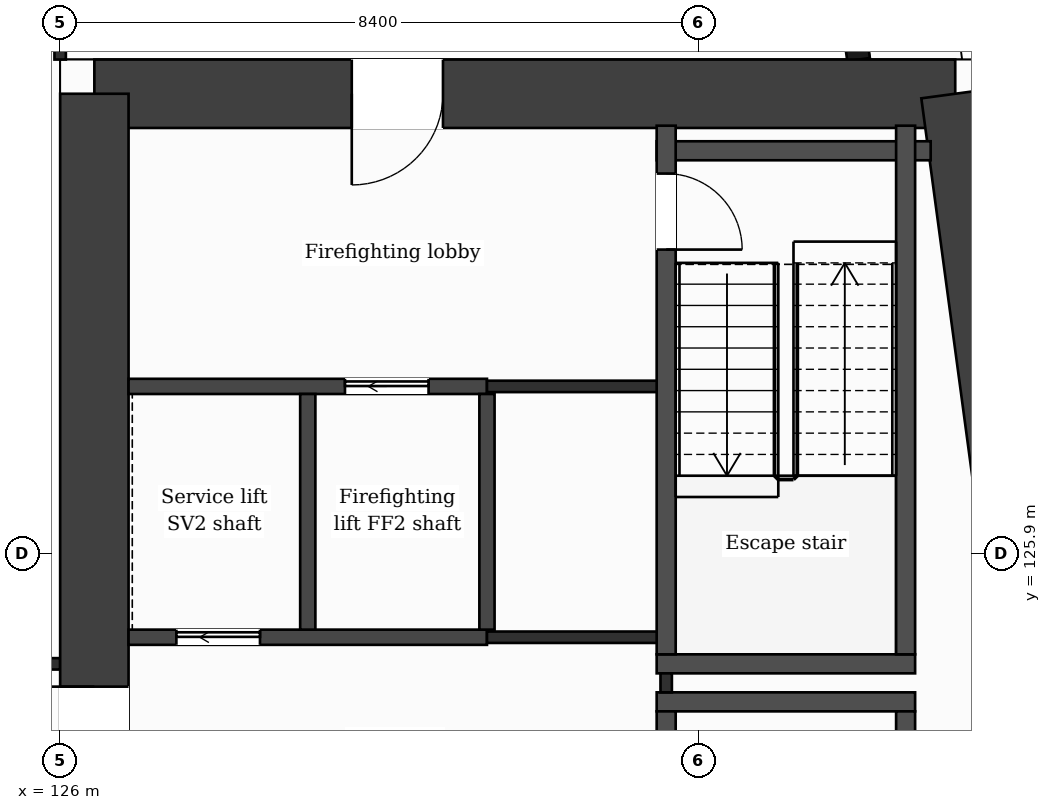
"""IFC4 building model, lengths in metres.
Left out: names, types, materials, properties, quantities, classifications, styles, units other than length and angle.
Written with IfcOpenShell. Run it as: python <this file> out.ifc"""

import sys

from ifc_helpers import new_model, si_unit, direction, frame, frame_2d, origin, place, context, subcontext, project, spatial, rectangle, extrude, element, fill, save


model = new_model("IFC4")
c1 = context("Model", 3, precision=1e-05, world=origin(), true_north=direction((0.0, 1.0)))
c2 = subcontext(c1, "Body", "Model", "MODEL_VIEW")
j1 = project(units=[si_unit("LENGTHUNIT", "METRE"), si_unit("PLANEANGLEUNIT", "RADIAN")], contexts=[c1])
p1 = place(None, origin())
s1 = spatial("IfcSite", under=j1, at=p1, CompositionType="ELEMENT")
p2 = place(p1, origin())
s2 = spatial("IfcBuilding", under=s1, at=p2, CompositionType="ELEMENT")
p3 = place(p2, frame((0.0, 0.0, 166.3)))
s3 = spatial("IfcBuildingStorey", under=s2, at=p3, CompositionType="ELEMENT", Elevation=166.3)
p4 = place(p3, frame((126.45, 131.95, 0.0), z_axis=(0.0, 0.0, 1.0), x_axis=(1.0, 0.0, 0.0)))
e1 = element("IfcWall", 1, at=p4, inside=s3, PredefinedType="SHEAR", context=c2, shape_type="SweptSolid", body=[
    extrude(rectangle(XDim=11.326, YDim=0.9, at=frame_2d((5.663, 0.0))), origin(), (0.0, 0.0, 1.0), 3.7),
])
p5 = place(p4, frame((3.386, 0.0, 0.0)))
e2 = element("IfcOpeningElement", 2, at=p5, cuts=e1, PredefinedType="OPENING", context=c2, shape_type="SweptSolid", body=[
    extrude(rectangle(XDim=1.2, YDim=2.1, at=frame_2d((0.6, 1.05))), frame((0.0, 0.46, 0.0), z_axis=(0.0, -1.0, 0.0), x_axis=(1.0, 0.0, 0.0)), (0.0, 0.0, 1.0), 0.92),
])
p6 = place(p3, frame((137.776, 131.95, 0.0), z_axis=(0.0, 0.0, 1.0), x_axis=(0.133421759112, -0.991059349482, 0.0)))
e3 = element("IfcWall", 3, at=p6, inside=s3, PredefinedType="SHEAR", context=c2, shape_type="SweptSolid", body=[
    extrude(rectangle(XDim=21.29, YDim=0.9, at=frame_2d((10.645, 0.0))), origin(), (0.0, 0.0, 1.0), 3.7),
])
p7 = place(p3, frame((126.45, 110.85, 0.0), z_axis=(0.0, 0.0, 1.0), x_axis=(0.0, 1.0, 0.0)))
e4 = element("IfcWall", 4, at=p7, inside=s3, PredefinedType="SHEAR", context=c2, shape_type="SweptSolid", body=[
    extrude(rectangle(XDim=21.1, YDim=0.9, at=frame_2d((10.55, 0.0))), origin(), (0.0, 0.0, 1.0), 3.7),
])
p8 = place(p7, frame((11.9, 0.0, 0.0)))
e5 = element("IfcOpeningElement", 5, at=p8, cuts=e4, PredefinedType="OPENING", context=c2, shape_type="SweptSolid", body=[
    extrude(rectangle(XDim=1.4, YDim=2.1, at=frame_2d((0.7, 1.05))), frame((0.0, 0.46, 0.0), z_axis=(0.0, -1.0, 0.0), x_axis=(1.0, 0.0, 0.0)), (0.0, 0.0, 1.0), 0.92),
])
p9 = place(p3, frame((136.504, 132.4, 0.0), z_axis=(0.0, 0.0, 1.0), x_axis=(-0.133399697462, 0.99106231929, 0.0)))
e6 = element("IfcWall", 6, at=p9, inside=s3, PredefinedType="SOLIDWALL", context=c2, shape_type="SweptSolid", body=[
    extrude(rectangle(XDim=6.74, YDim=0.3, at=frame_2d((3.37, 0.0))), origin(), (0.0, 0.0, 1.0), 3.38),
])
p10 = place(p9, frame((1.115, 0.0, 0.0)))
e7 = element("IfcOpeningElement", 7, at=p10, cuts=e6, PredefinedType="OPENING", context=c2, shape_type="SweptSolid", body=[
    extrude(rectangle(XDim=1.2, YDim=2.4, at=frame_2d((0.6, 1.2))), frame((0.0, 0.16, 0.0), z_axis=(0.0, -1.0, 0.0), x_axis=(1.0, 0.0, 0.0)), (0.0, 0.0, 1.0), 0.32),
])
p11 = place(p9, frame((3.835, 0.0, 0.9)))
e8 = element("IfcOpeningElement", 8, at=p11, cuts=e6, PredefinedType="OPENING", context=c2, shape_type="SweptSolid", body=[
    extrude(rectangle(XDim=2.4, YDim=2.1, at=frame_2d((1.2, 1.05))), frame((0.0, 0.16, 0.0), z_axis=(0.0, -1.0, 0.0), x_axis=(1.0, 0.0, 0.0)), (0.0, 0.0, 1.0), 0.32),
])
for number, where, z_axis, x_axis in (
    (9, (133.848, 123.95, 0.0), (0.0, 0.0, 1.0), (1.0, 0.0, 0.0)),
    (10, (133.848, 124.45, 0.0), (0.0, 0.0, 1.0), (1.0, 0.0, 0.0)),
):
    element("IfcWall", number, at=place(p3, frame(where, z_axis=z_axis, x_axis=x_axis)), inside=s3, PredefinedType="PARTITIONING", context=c2, shape_type="SweptSolid", body=[
        extrude(rectangle(XDim=3.4, YDim=0.25, at=frame_2d((1.7, 0.0))), origin(), (0.0, 0.0, 1.0), 3.38),
    ])
p12 = place(p3, frame((100.8, 124.45, 0.0), z_axis=(0.0, 0.0, 1.0), x_axis=(1.0, 0.0, 0.0)))
e11 = element("IfcWall", 11, at=p12, inside=s3, PredefinedType="PARTITIONING", context=c2, shape_type="SweptSolid", body=[
    extrude(rectangle(XDim=25.2, YDim=0.15, at=frame_2d((12.6, 0.0))), origin(), (0.0, 0.0, 1.0), 3.38),
])
p13 = place(p12, frame((4.275, 0.0, 0.0)))
e12 = element("IfcOpeningElement", 12, at=p13, cuts=e11, PredefinedType="OPENING", context=c2, shape_type="SweptSolid", body=[
    extrude(rectangle(XDim=1.0, YDim=2.1, at=frame_2d((0.5, 1.05))), frame((0.0, 0.085, 0.0), z_axis=(0.0, -1.0, 0.0), x_axis=(1.0, 0.0, 0.0)), (0.0, 0.0, 1.0), 0.17),
])
p14 = place(p12, frame((0.675, 0.0, 0.0)))
e13 = element("IfcOpeningElement", 13, at=p14, cuts=e11, PredefinedType="OPENING", context=c2, shape_type="SweptSolid", body=[
    extrude(rectangle(XDim=1.0, YDim=2.1, at=frame_2d((0.5, 1.05))), frame((0.0, 0.085, 0.0), z_axis=(0.0, -1.0, 0.0), x_axis=(1.0, 0.0, 0.0)), (0.0, 0.0, 1.0), 0.17),
])
p15 = place(p12, frame((10.425, 0.0, 0.0)))
e14 = element("IfcOpeningElement", 14, at=p15, cuts=e11, PredefinedType="OPENING", context=c2, shape_type="SweptSolid", body=[
    extrude(rectangle(XDim=1.0, YDim=2.1, at=frame_2d((0.5, 1.05))), frame((0.0, 0.085, 0.0), z_axis=(0.0, -1.0, 0.0), x_axis=(1.0, 0.0, 0.0)), (0.0, 0.0, 1.0), 0.17),
])
p16 = place(p12, frame((22.175, 0.0, 0.0)))
e15 = element("IfcOpeningElement", 15, at=p16, cuts=e11, PredefinedType="OPENING", context=c2, shape_type="SweptSolid", body=[
    extrude(rectangle(XDim=1.0, YDim=2.1, at=frame_2d((0.5, 1.05))), frame((0.0, 0.085, 0.0), z_axis=(0.0, -1.0, 0.0), x_axis=(1.0, 0.0, 0.0)), (0.0, 0.0, 1.0), 0.17),
])
p17 = place(p3, frame((126.9, 124.8, 0.0), z_axis=(0.0, 0.0, 1.0), x_axis=(1.0, 0.0, 0.0)))
e16 = element("IfcWall", 16, at=p17, inside=s3, PredefinedType="PARTITIONING", context=c2, shape_type="SweptSolid", body=[
    extrude(rectangle(XDim=4.715, YDim=0.2, at=frame_2d((2.358, 0.0))), origin(), (0.0, 0.0, 1.0), 3.38),
])
p18 = place(p17, frame((0.629, 0.0, 0.0)))
e17 = element("IfcOpeningElement", 17, at=p18, cuts=e16, PredefinedType="OPENING", context=c2, shape_type="SweptSolid", body=[
    extrude(rectangle(XDim=1.1, YDim=2.1, at=frame_2d((0.55, 1.05))), frame((0.0, 0.11, 0.0), z_axis=(0.0, -1.0, 0.0), x_axis=(1.0, 0.0, 0.0)), (0.0, 0.0, 1.0), 0.22),
])
p19 = place(p3, frame((131.615, 124.8, 0.0), z_axis=(0.0, 0.0, 1.0), x_axis=(1.0, 0.0, 0.0)))
e18 = element("IfcWall", 18, at=p19, inside=s3, PredefinedType="PARTITIONING", context=c2, shape_type="SweptSolid", body=[
    extrude(rectangle(XDim=2.483, YDim=0.15, at=frame_2d((1.241, 0.0))), origin(), (0.0, 0.0, 1.0), 3.38),
])
p20 = place(p3, frame((126.9, 128.1, 0.0), z_axis=(0.0, 0.0, 1.0), x_axis=(1.0, 0.0, 0.0)))
e19 = element("IfcWall", 19, at=p20, inside=s3, PredefinedType="PARTITIONING", context=c2, shape_type="SweptSolid", body=[
    extrude(rectangle(XDim=4.715, YDim=0.2, at=frame_2d((2.358, 0.0))), origin(), (0.0, 0.0, 1.0), 3.38),
])
p21 = place(p20, frame((2.847, 0.0, 0.0)))
e20 = element("IfcOpeningElement", 20, at=p21, cuts=e19, PredefinedType="OPENING", context=c2, shape_type="SweptSolid", body=[
    extrude(rectangle(XDim=1.1, YDim=2.1, at=frame_2d((0.55, 1.05))), frame((0.0, 0.11, 0.0), z_axis=(0.0, -1.0, 0.0), x_axis=(1.0, 0.0, 0.0)), (0.0, 0.0, 1.0), 0.22),
])
p22 = place(p3, frame((131.615, 128.1, 0.0), z_axis=(0.0, 0.0, 1.0), x_axis=(1.0, 0.0, 0.0)))
e21 = element("IfcWall", 21, at=p22, inside=s3, PredefinedType="PARTITIONING", context=c2, shape_type="SweptSolid", body=[
    extrude(rectangle(XDim=2.358, YDim=0.15, at=frame_2d((1.179, 0.0))), origin(), (0.0, 0.0, 1.0), 3.38),
])
p23 = place(p3, frame((133.848, 131.2, 0.0), z_axis=(0.0, 0.0, 1.0), x_axis=(1.0, 0.0, 0.0)))
e22 = element("IfcWall", 22, at=p23, inside=s3, PredefinedType="PARTITIONING", context=c2, shape_type="SweptSolid", body=[
    extrude(rectangle(XDim=3.605, YDim=0.25, at=frame_2d((1.802, 0.0))), origin(), (0.0, 0.0, 1.0), 3.38),
])
p24 = place(p3, frame((126.0, 132.4, 0.0), z_axis=(0.0, 0.0, 1.0), x_axis=(0.0, 1.0, 0.0)))
e23 = element("IfcWall", 23, at=p24, inside=s3, PredefinedType="PARTITIONING", context=c2, shape_type="SweptSolid", body=[
    extrude(rectangle(XDim=1.325, YDim=0.15, at=frame_2d((0.663, 0.0))), origin(), (0.0, 0.0, 1.0), 3.38),
])
for number, where, z_axis, x_axis in (
    (24, (129.258, 124.9, 0.0), (0.0, 0.0, 1.0), (0.0, 1.0, 0.0)),
    (25, (131.615, 124.9, 0.0), (0.0, 0.0, 1.0), (0.0, 1.0, 0.0)),
):
    element("IfcWall", number, at=place(p3, frame(where, z_axis=z_axis, x_axis=x_axis)), inside=s3, PredefinedType="PARTITIONING", context=c2, shape_type="SweptSolid", body=[
        extrude(rectangle(XDim=3.1, YDim=0.2, at=frame_2d((1.55, 0.0))), origin(), (0.0, 0.0, 1.0), 3.38),
    ])
p25 = place(p3, frame((133.973, 124.075, 0.0), z_axis=(0.0, 0.0, 1.0), x_axis=(0.0, 1.0, 0.0)))
e26 = element("IfcWall", 26, at=p25, inside=s3, PredefinedType="PARTITIONING", context=c2, shape_type="SweptSolid", body=[
    extrude(rectangle(XDim=0.25, YDim=0.15, at=frame_2d((0.125, 0.0))), origin(), (0.0, 0.0, 1.0), 3.38),
])
p26 = place(p3, frame((133.973, 116.87, 0.0), z_axis=(0.0, 0.0, 1.0), x_axis=(0.0, 1.0, 0.0)))
e27 = element("IfcWall", 27, at=p26, inside=s3, PredefinedType="PARTITIONING", context=c2, shape_type="SweptSolid", body=[
    extrude(rectangle(XDim=6.955, YDim=0.25, at=frame_2d((3.478, 0.0))), origin(), (0.0, 0.0, 1.0), 3.38),
])
p27 = place(p26, frame((5.655, 0.0, 0.0)))
e28 = element("IfcOpeningElement", 28, at=p27, cuts=e27, PredefinedType="OPENING", context=c2, shape_type="SweptSolid", body=[
    extrude(rectangle(XDim=0.95, YDim=2.1, at=frame_2d((0.475, 1.05))), frame((0.0, 0.135, 0.0), z_axis=(0.0, -1.0, 0.0), x_axis=(1.0, 0.0, 0.0)), (0.0, 0.0, 1.0), 0.27),
])
p28 = place(p3, frame((133.973, 124.575, 0.0), z_axis=(0.0, 0.0, 1.0), x_axis=(0.0, 1.0, 0.0)))
e29 = element("IfcWall", 29, at=p28, inside=s3, PredefinedType="PARTITIONING", context=c2, shape_type="SweptSolid", body=[
    extrude(rectangle(XDim=6.955, YDim=0.25, at=frame_2d((3.478, 0.0))), origin(), (0.0, 0.0, 1.0), 3.38),
])
p29 = place(p28, frame((5.325, 0.0, 0.0)))
e30 = element("IfcOpeningElement", 30, at=p29, cuts=e29, PredefinedType="OPENING", context=c2, shape_type="SweptSolid", body=[
    extrude(rectangle(XDim=1.0, YDim=2.1, at=frame_2d((0.5, 1.05))), frame((0.0, 0.135, 0.0), z_axis=(0.0, -1.0, 0.0), x_axis=(1.0, 0.0, 0.0)), (0.0, 0.0, 1.0), 0.27),
])
p30 = place(p3, frame((137.123, 116.87, 0.0), z_axis=(0.0, 0.0, 1.0), x_axis=(0.0, 1.0, 0.0)))
e31 = element("IfcWall", 31, at=p30, inside=s3, PredefinedType="PARTITIONING", context=c2, shape_type="SweptSolid", body=[
    extrude(rectangle(XDim=6.955, YDim=0.25, at=frame_2d((3.478, 0.0))), origin(), (0.0, 0.0, 1.0), 3.38),
])
p31 = place(p3, frame((137.123, 124.575, 0.0), z_axis=(0.0, 0.0, 1.0), x_axis=(0.0, 1.0, 0.0)))
e32 = element("IfcWall", 32, at=p31, inside=s3, PredefinedType="PARTITIONING", context=c2, shape_type="SweptSolid", body=[
    extrude(rectangle(XDim=6.955, YDim=0.25, at=frame_2d((3.478, 0.0))), origin(), (0.0, 0.0, 1.0), 3.38),
])
p32 = place(p21, origin())
e33 = element("IfcDoor", 33, at=p32, inside=s3, OperationType="SLIDING_TO_LEFT", PredefinedType="DOOR", context=c2, shape_type="SweptSolid", body=[
    extrude(rectangle(XDim=1.1, YDim=2.1, at=frame_2d((0.55, 1.05))), frame((0.0, 0.025, 0.0), z_axis=(0.0, -1.0, 0.0), x_axis=(1.0, 0.0, 0.0)), (0.0, 0.0, 1.0), 0.05),
])
fill(e20, e33)
p33 = place(p18, origin())
e34 = element("IfcDoor", 34, at=p33, inside=s3, OperationType="SLIDING_TO_LEFT", PredefinedType="DOOR", context=c2, shape_type="SweptSolid", body=[
    extrude(rectangle(XDim=1.1, YDim=2.1, at=frame_2d((0.55, 1.05))), frame((0.0, 0.025, 0.0), z_axis=(0.0, -1.0, 0.0), x_axis=(1.0, 0.0, 0.0)), (0.0, 0.0, 1.0), 0.05),
])
fill(e17, e34)
p34 = place(p29, origin())
e35 = element("IfcDoor", 35, at=p34, inside=s3, OperationType="SINGLE_SWING_LEFT", PredefinedType="DOOR", context=c2, shape_type="SweptSolid", body=[
    extrude(rectangle(XDim=1.0, YDim=2.1, at=frame_2d((0.5, 1.05))), frame((0.0, 0.025, 0.0), z_axis=(0.0, -1.0, 0.0), x_axis=(1.0, 0.0, 0.0)), (0.0, 0.0, 1.0), 0.05),
])
fill(e30, e35)
p35 = place(p5, origin())
e36 = element("IfcDoor", 36, at=p35, inside=s3, OperationType="SINGLE_SWING_LEFT", PredefinedType="DOOR", context=c2, shape_type="SweptSolid", body=[
    extrude(rectangle(XDim=1.2, YDim=2.1, at=frame_2d((0.6, 1.05))), frame((0.0, 0.025, 0.0), z_axis=(0.0, -1.0, 0.0), x_axis=(1.0, 0.0, 0.0)), (0.0, 0.0, 1.0), 0.05),
])
fill(e2, e36)
p36 = place(p8, origin())
e37 = element("IfcDoor", 37, at=p36, inside=s3, OperationType="SINGLE_SWING_RIGHT", PredefinedType="DOOR", context=c2, shape_type="SweptSolid", body=[
    extrude(rectangle(XDim=1.4, YDim=2.1, at=frame_2d((0.7, 1.05))), frame((0.0, 0.025, 0.0), z_axis=(0.0, -1.0, 0.0), x_axis=(1.0, 0.0, 0.0)), (0.0, 0.0, 1.0), 0.05),
])
fill(e5, e37)
save(model, sys.argv[1])
